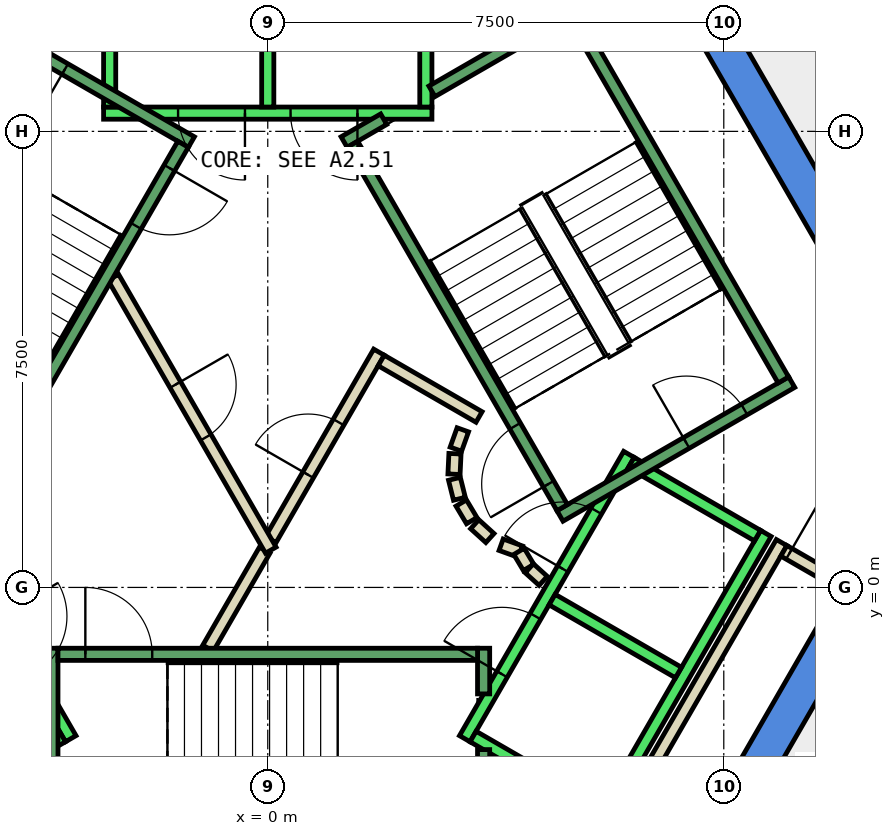
"""IFC4 building model, lengths in metres.
Left out: names, types, materials, properties, quantities, classifications, styles, units other than length and angle.
Written with IfcOpenShell. Run it as: python <this file> out.ifc"""

import sys

from ifc_helpers import new_model, si_unit, direction, frame, frame_2d, origin, place, context, subcontext, project, spatial, polyline, rectangle, outline, extrude, element, fill, save


model = new_model("IFC4")
c1 = context("Model", 3, precision=1e-05, world=origin(), true_north=direction((0.0, 1.0)))
c2 = subcontext(c1, "Body", "Model", "MODEL_VIEW")
j1 = project(units=[si_unit("LENGTHUNIT", "METRE"), si_unit("PLANEANGLEUNIT", "RADIAN")], contexts=[c1])
p1 = place(None, origin())
s1 = spatial("IfcSite", under=j1, at=p1, CompositionType="ELEMENT")
p2 = place(p1, origin())
s2 = spatial("IfcBuilding", under=s1, at=p2, CompositionType="ELEMENT")
p3 = place(p2, frame((0.0, 0.0, 245.0)))
s3 = spatial("IfcBuildingStorey", under=s2, at=p3, CompositionType="ELEMENT", Elevation=245.0)
p4 = place(p3, frame((0.0, 0.0, -0.34)))
e1 = element("IfcWall", 1, at=p4, inside=s3, PredefinedType="SHEAR", context=c2, shape_type="SweptSolid", body=[
    extrude(outline(polyline([(6.786, 10.747), (6.266, 10.447), (10.854, 2.5), (11.547, 2.5), (6.786, 10.747)])), origin(), (0.0, 0.0, 1.0), 3.6),
])
p5 = place(p3, frame((0.0, 0.0, -0.34)))
e2 = element("IfcWall", 2, at=p5, inside=s3, PredefinedType="SHEAR", context=c2, shape_type="SweptSolid", body=[
    extrude(outline(polyline([(5.774, -7.5), (11.547, 2.5), (10.854, 2.5), (5.427, -6.9), (5.774, -7.5)])), origin(), (0.0, 0.0, 1.0), 3.6),
])
p6 = place(p3, frame((5.751, -3.938, 0.0), z_axis=(0.0, 0.0, 1.0), x_axis=(0.500034260056, 0.866005622828, 0.0)))
e3 = element("IfcWall", 3, at=p6, inside=s3, PredefinedType="PARTITIONING", context=c2, shape_type="SweptSolid", body=[
    extrude(rectangle(XDim=5.399, YDim=0.2, at=frame_2d((2.7, 0.0))), origin(), (0.0, 0.0, 1.0), 3.26),
])
p7 = place(p3, frame((8.488, 0.602, 0.0), z_axis=(0.0, 0.0, 1.0), x_axis=(0.866063652425, -0.499933745558, 0.0)))
e4 = element("IfcWall", 4, at=p7, inside=s3, PredefinedType="PARTITIONING", context=c2, shape_type="SweptSolid", body=[
    extrude(rectangle(XDim=1.1, YDim=0.2, at=frame_2d((0.55, 0.0))), origin(), (0.0, 0.0, 1.0), 3.26),
])
p8 = place(p7, frame((0.1, 0.0, 0.0)))
e5 = element("IfcOpeningElement", 5, at=p8, cuts=e4, PredefinedType="OPENING", context=c2, shape_type="SweptSolid", body=[
    extrude(rectangle(XDim=0.9, YDim=2.1, at=frame_2d((0.45, 1.05))), frame((0.0, 0.11, 0.0), z_axis=(0.0, -1.0, 0.0), x_axis=(1.0, 0.0, 0.0)), (0.0, 0.0, 1.0), 0.22),
])
p9 = place(p3, frame((-0.982, -1.0, 0.0), z_axis=(0.0, 0.0, 1.0), x_axis=(0.50024047865, 0.865886518847, 0.0)))
e6 = element("IfcWall", 6, at=p9, inside=s3, PredefinedType="PARTITIONING", context=c2, shape_type="SweptSolid", body=[
    extrude(rectangle(XDim=1.863, YDim=0.2, at=frame_2d((0.931, 0.0))), origin(), (0.0, 0.0, 1.0), 3.26),
])
p10 = place(p3, frame((0.05, 0.787, 0.0), z_axis=(0.0, 0.0, 1.0), x_axis=(0.499954076797, 0.866051915934, 0.0)))
e7 = element("IfcWall", 7, at=p10, inside=s3, PredefinedType="PARTITIONING", context=c2, shape_type="SweptSolid", body=[
    extrude(rectangle(XDim=3.558, YDim=0.2, at=frame_2d((1.779, 0.0))), origin(), (0.0, 0.0, 1.0), 3.26),
])
p11 = place(p10, frame((1.229, 0.0, 0.0)))
e8 = element("IfcOpeningElement", 8, at=p11, cuts=e7, PredefinedType="OPENING", context=c2, shape_type="SweptSolid", body=[
    extrude(rectangle(XDim=1.0, YDim=2.1, at=frame_2d((0.5, 1.05))), frame((0.0, 0.11, 0.0), z_axis=(0.0, -1.0, 0.0), x_axis=(1.0, 0.0, 0.0)), (0.0, 0.0, 1.0), 0.22),
])
p12 = place(p3, frame((1.866, 3.732, 0.0), z_axis=(0.0, 0.0, 1.0), x_axis=(0.866043361281, -0.499968895414, 0.0)))
e9 = element("IfcWall", 9, at=p12, inside=s3, PredefinedType="PARTITIONING", context=c2, shape_type="SweptSolid", body=[
    extrude(rectangle(XDim=1.858, YDim=0.2, at=frame_2d((0.929, 0.0))), origin(), (0.0, 0.0, 1.0), 3.26),
])
p13 = place(p3, frame((3.208, 2.592, 0.0), z_axis=(0.0, 0.0, 1.0), x_axis=(-0.337388820924, -0.941365382578, 0.0)))
e10 = element("IfcWall", 10, at=p13, inside=s3, PredefinedType="PARTITIONING", context=c2, shape_type="SweptSolid", body=[
    extrude(rectangle(XDim=0.338, YDim=0.2, at=frame_2d((0.169, 0.0))), origin(), (0.0, 0.0, 1.0), 3.26),
])
p14 = place(p3, frame((3.079, 2.199, 0.0), z_axis=(0.0, 0.0, 1.0), x_axis=(-0.047771483479, -0.998858290933, 0.0)))
e11 = element("IfcWall", 11, at=p14, inside=s3, PredefinedType="PARTITIONING", context=c2, shape_type="SweptSolid", body=[
    extrude(rectangle(XDim=0.337, YDim=0.2, at=frame_2d((0.169, 0.0))), origin(), (0.0, 0.0, 1.0), 3.26),
])
p15 = place(p3, frame((3.07, 1.786, 0.0), z_axis=(0.0, 0.0, 1.0), x_axis=(0.242705583207, -0.970099994784, 0.0)))
e12 = element("IfcWall", 12, at=p15, inside=s3, PredefinedType="PARTITIONING", context=c2, shape_type="SweptSolid", body=[
    extrude(rectangle(XDim=0.338, YDim=0.2, at=frame_2d((0.169, 0.0))), origin(), (0.0, 0.0, 1.0), 3.26),
])
for number, where, z_axis, x_axis in (
    (13, (3.182, 1.388, 0.0), (0.0, 0.0, 1.0), (0.512, -0.859, 0.0)),
    (14, (3.404, 1.039, 0.0), (0.0, 0.0, 1.0), (0.74, -0.672, 0.0)),
):
    element("IfcWall", number, at=place(p3, frame(where, z_axis=z_axis, x_axis=x_axis)), inside=s3, PredefinedType="PARTITIONING", context=c2, shape_type="SweptSolid", body=[
        extrude(rectangle(XDim=0.338, YDim=0.2, at=frame_2d((0.169, 0.0))), origin(), (0.0, 0.0, 1.0), 3.26),
    ])
p16 = place(p3, frame((3.838, 0.702, 0.0), z_axis=(0.0, 0.0, 1.0), x_axis=(0.941035081519, -0.338308993895, 0.0)))
e15 = element("IfcWall", 15, at=p16, inside=s3, PredefinedType="PARTITIONING", context=c2, shape_type="SweptSolid", body=[
    extrude(rectangle(XDim=0.337, YDim=0.2, at=frame_2d((0.168, 0.0))), origin(), (0.0, 0.0, 1.0), 3.26),
])
p17 = place(p3, frame((4.132, 0.593, 0.0), z_axis=(0.0, 0.0, 1.0), x_axis=(0.513561617048, -0.858052717201, 0.0)))
e16 = element("IfcWall", 16, at=p17, inside=s3, PredefinedType="PARTITIONING", context=c2, shape_type="SweptSolid", body=[
    extrude(rectangle(XDim=0.308, YDim=0.2, at=frame_2d((0.154, 0.0))), origin(), (0.0, 0.0, 1.0), 3.26),
])
p18 = place(p3, frame((4.301, 0.315, 0.0), z_axis=(0.0, 0.0, 1.0), x_axis=(0.741798017506, -0.670623367639, 0.0)))
e17 = element("IfcWall", 17, at=p18, inside=s3, PredefinedType="PARTITIONING", context=c2, shape_type="SweptSolid", body=[
    extrude(rectangle(XDim=0.309, YDim=0.2, at=frame_2d((0.154, 0.0))), origin(), (0.0, 0.0, 1.0), 3.26),
])
p19 = place(p3, frame((-2.54, 5.1, 0.0), z_axis=(0.0, 0.0, 1.0), x_axis=(0.499925051871, -0.866068670783, 0.0)))
e18 = element("IfcWall", 18, at=p19, inside=s3, PredefinedType="PARTITIONING", context=c2, shape_type="SweptSolid", body=[
    extrude(rectangle(XDim=5.181, YDim=0.2, at=frame_2d((2.59, 0.0))), origin(), (0.0, 0.0, 1.0), 3.26),
])
p20 = place(p19, frame((2.04, 0.0, 0.0)))
e19 = element("IfcOpeningElement", 19, at=p20, cuts=e18, PredefinedType="OPENING", context=c2, shape_type="SweptSolid", body=[
    extrude(rectangle(XDim=1.0, YDim=2.1, at=frame_2d((0.5, 1.05))), frame((0.0, 0.11, 0.0), z_axis=(0.0, -1.0, 0.0), x_axis=(1.0, 0.0, 0.0)), (0.0, 0.0, 1.0), 0.22),
])
p21 = place(p3, frame((2.7, 7.8, 0.0), z_axis=(0.0, 0.0, 1.0), x_axis=(-1.0, 0.0, 0.0)))
e20 = element("IfcWall", 20, at=p21, inside=s3, PredefinedType="STANDARD", context=c2, shape_type="SweptSolid", body=[
    extrude(rectangle(XDim=5.4, YDim=0.2, at=frame_2d((2.7, 0.0))), origin(), (0.0, 0.0, 1.0), 3.26),
])
p22 = place(p21, frame((1.225, 0.0, 0.0)))
e21 = element("IfcOpeningElement", 21, at=p22, cuts=e20, PredefinedType="OPENING", context=c2, shape_type="SweptSolid", body=[
    extrude(rectangle(XDim=1.1, YDim=2.1, at=frame_2d((0.55, 1.05))), frame((0.0, 0.11, 0.0), z_axis=(0.0, -1.0, 0.0), x_axis=(1.0, 0.0, 0.0)), (0.0, 0.0, 1.0), 0.22),
])
p23 = place(p21, frame((3.075, 0.0, 0.0)))
e22 = element("IfcOpeningElement", 22, at=p23, cuts=e20, PredefinedType="OPENING", context=c2, shape_type="SweptSolid", body=[
    extrude(rectangle(XDim=1.1, YDim=2.1, at=frame_2d((0.55, 1.05))), frame((0.0, 0.11, 0.0), z_axis=(0.0, -1.0, 0.0), x_axis=(1.0, 0.0, 0.0)), (0.0, 0.0, 1.0), 0.22),
])
for number, where, z_axis, x_axis in (
    (23, (2.6, 7.9, 0.0), (0.0, 0.0, 1.0), (0.0, 1.0, 0.0)),
    (24, (0.0, 7.9, 0.0), (0.0, 0.0, 1.0), (0.0, 1.0, 0.0)),
    (25, (-2.6, 7.9, 0.0), (0.0, 0.0, 1.0), (0.0, 1.0, 0.0)),
):
    element("IfcWall", number, at=place(p3, frame(where, z_axis=z_axis, x_axis=x_axis)), inside=s3, PredefinedType="STANDARD", context=c2, shape_type="SweptSolid", body=[
        extrude(rectangle(XDim=2.4, YDim=0.2, at=frame_2d((1.2, 0.0))), origin(), (0.0, 0.0, 1.0), 3.26),
    ])
p24 = place(p3, frame((-5.94, 2.188, 0.0), z_axis=(0.0, 0.0, 1.0), x_axis=(0.500034260056, -0.866005622828, 0.0)))
e26 = element("IfcWall", 26, at=p24, inside=s3, PredefinedType="STANDARD", context=c2, shape_type="SweptSolid", body=[
    extrude(rectangle(XDim=5.399, YDim=0.2, at=frame_2d((2.7, 0.0))), origin(), (0.0, 0.0, 1.0), 3.26),
])
p25 = place(p24, frame((3.075, 0.0, 0.0)))
e27 = element("IfcOpeningElement", 27, at=p25, cuts=e26, PredefinedType="OPENING", context=c2, shape_type="SweptSolid", body=[
    extrude(rectangle(XDim=1.1, YDim=2.1, at=frame_2d((0.55, 1.05))), frame((0.0, 0.11, 0.0), z_axis=(0.0, -1.0, 0.0), x_axis=(1.0, 0.0, 0.0)), (0.0, 0.0, 1.0), 0.22),
])
p26 = place(p24, frame((1.225, 0.0, 0.0)))
e28 = element("IfcOpeningElement", 28, at=p26, cuts=e26, PredefinedType="OPENING", context=c2, shape_type="SweptSolid", body=[
    extrude(rectangle(XDim=1.1, YDim=2.1, at=frame_2d((0.55, 1.05))), frame((0.0, 0.11, 0.0), z_axis=(0.0, -1.0, 0.0), x_axis=(1.0, 0.0, 0.0)), (0.0, 0.0, 1.0), 0.22),
])
p27 = place(p3, frame((-3.377, -2.452, 0.0), z_axis=(0.0, 0.0, 1.0), x_axis=(-0.865955154139, -0.50012165622, 0.0)))
e29 = element("IfcWall", 29, at=p27, inside=s3, PredefinedType="STANDARD", context=c2, shape_type="SweptSolid", body=[
    extrude(rectangle(XDim=2.4, YDim=0.2, at=frame_2d((1.2, 0.0))), origin(), (0.0, 0.0, 1.0), 3.26),
])
p28 = place(p3, frame((3.24, -2.488, 0.0), z_axis=(0.0, 0.0, 1.0), x_axis=(0.500034260056, 0.866005622828, 0.0)))
e30 = element("IfcWall", 30, at=p28, inside=s3, PredefinedType="STANDARD", context=c2, shape_type="SweptSolid", body=[
    extrude(rectangle(XDim=5.399, YDim=0.2, at=frame_2d((2.7, 0.0))), origin(), (0.0, 0.0, 1.0), 3.26),
])
p29 = place(p28, frame((3.225, 0.0, 0.0)))
e31 = element("IfcOpeningElement", 31, at=p29, cuts=e30, PredefinedType="OPENING", context=c2, shape_type="SweptSolid", body=[
    extrude(rectangle(XDim=1.1, YDim=2.1, at=frame_2d((0.55, 1.05))), frame((0.0, 0.11, 0.0), z_axis=(0.0, -1.0, 0.0), x_axis=(1.0, 0.0, 0.0)), (0.0, 0.0, 1.0), 0.22),
])
p30 = place(p28, frame((1.225, 0.0, 0.0)))
e32 = element("IfcOpeningElement", 32, at=p30, cuts=e30, PredefinedType="OPENING", context=c2, shape_type="SweptSolid", body=[
    extrude(rectangle(XDim=1.1, YDim=2.1, at=frame_2d((0.55, 1.05))), frame((0.0, 0.11, 0.0), z_axis=(0.0, -1.0, 0.0), x_axis=(1.0, 0.0, 0.0)), (0.0, 0.0, 1.0), 0.22),
])
p31 = place(p3, frame((5.492, -3.788, 0.0), z_axis=(0.0, 0.0, 1.0), x_axis=(0.500034260056, 0.866005622828, 0.0)))
e33 = element("IfcWall", 33, at=p31, inside=s3, PredefinedType="STANDARD", context=c2, shape_type="SweptSolid", body=[
    extrude(rectangle(XDim=5.399, YDim=0.2, at=frame_2d((2.7, 0.0))), origin(), (0.0, 0.0, 1.0), 3.26),
])
p32 = place(p3, frame((3.377, -2.452, 0.0), z_axis=(0.0, 0.0, 1.0), x_axis=(0.865955154139, -0.50012165622, 0.0)))
e34 = element("IfcWall", 34, at=p32, inside=s3, PredefinedType="STANDARD", context=c2, shape_type="SweptSolid", body=[
    extrude(rectangle(XDim=2.4, YDim=0.2, at=frame_2d((1.2, 0.0))), origin(), (0.0, 0.0, 1.0), 3.26),
])
for number, where, z_axis, x_axis in (
    (35, (4.677, -0.2, 0.0), (0.0, 0.0, 1.0), (0.866, -0.5, 0.0)),
    (36, (5.977, 2.052, 0.0), (0.0, 0.0, 1.0), (0.866, -0.5, 0.0)),
):
    element("IfcWall", number, at=place(p3, frame(where, z_axis=z_axis, x_axis=x_axis)), inside=s3, PredefinedType="STANDARD", context=c2, shape_type="SweptSolid", body=[
        extrude(rectangle(XDim=2.399, YDim=0.2, at=frame_2d((1.2, 0.0))), origin(), (0.0, 0.0, 1.0), 3.26),
    ])
p33 = place(p3, frame((-3.55, -1.0, 0.0), z_axis=(0.0, 0.0, 1.0), x_axis=(0.0, -1.0, 0.0)))
e37 = element("IfcWall", 37, at=p33, inside=s3, PredefinedType="STANDARD", context=c2, shape_type="SweptSolid", body=[
    extrude(rectangle(XDim=4.4, YDim=0.2, at=frame_2d((2.2, 0.0))), origin(), (0.0, 0.0, 1.0), 3.26),
])
p34 = place(p33, frame((2.4, 0.0, 0.0)))
e38 = element("IfcOpeningElement", 38, at=p34, cuts=e37, PredefinedType="OPENING", context=c2, shape_type="SweptSolid", body=[
    extrude(rectangle(XDim=1.1, YDim=2.2, at=frame_2d((0.55, 1.1))), frame((0.0, 0.11, 0.0), z_axis=(0.0, -1.0, 0.0), x_axis=(1.0, 0.0, 0.0)), (0.0, 0.0, 1.0), 0.22),
])
p35 = place(p3, frame((3.55, -2.667, 0.0), z_axis=(0.0, 0.0, 1.0), x_axis=(0.0, -1.0, 0.0)))
e39 = element("IfcWall", 39, at=p35, inside=s3, PredefinedType="STANDARD", context=c2, shape_type="SweptSolid", body=[
    extrude(rectangle(XDim=2.733, YDim=0.2, at=frame_2d((1.366, 0.0))), origin(), (0.0, 0.0, 1.0), 3.26),
])
p36 = place(p3, frame((3.55, -1.0, 0.0), z_axis=(0.0, 0.0, 1.0), x_axis=(0.0, -1.0, 0.0)))
e40 = element("IfcWall", 40, at=p36, inside=s3, PredefinedType="STANDARD", context=c2, shape_type="SweptSolid", body=[
    extrude(rectangle(XDim=0.751, YDim=0.2, at=frame_2d((0.375, 0.0))), origin(), (0.0, 0.0, 1.0), 3.26),
])
p37 = place(p3, frame((-3.45, -1.1, 0.0), z_axis=(0.0, 0.0, 1.0), x_axis=(1.0, 0.0, 0.0)))
e41 = element("IfcWall", 41, at=p37, inside=s3, PredefinedType="STANDARD", context=c2, shape_type="SweptSolid", body=[
    extrude(rectangle(XDim=6.9, YDim=0.2, at=frame_2d((3.45, 0.0))), origin(), (0.0, 0.0, 1.0), 3.26),
])
p38 = place(p37, frame((0.45, 0.0, 0.0)))
e42 = element("IfcOpeningElement", 42, at=p38, cuts=e41, PredefinedType="OPENING", context=c2, shape_type="SweptSolid", body=[
    extrude(rectangle(XDim=1.1, YDim=2.2, at=frame_2d((0.55, 1.1))), frame((0.0, 0.11, 0.0), z_axis=(0.0, -1.0, 0.0), x_axis=(1.0, 0.0, 0.0)), (0.0, 0.0, 1.0), 0.22),
])
p39 = place(p3, frame((4.806, 1.176, 0.0), z_axis=(0.0, 0.0, 1.0), x_axis=(0.866059941101, 0.499940174841, 0.0)))
e43 = element("IfcWall", 43, at=p39, inside=s3, PredefinedType="STANDARD", context=c2, shape_type="SweptSolid", body=[
    extrude(rectangle(XDim=4.4, YDim=0.2, at=frame_2d((2.2, 0.0))), origin(), (0.0, 0.0, 1.0), 3.26),
])
p40 = place(p39, frame((2.4, 0.0, 0.0)))
e44 = element("IfcOpeningElement", 44, at=p40, cuts=e43, PredefinedType="OPENING", context=c2, shape_type="SweptSolid", body=[
    extrude(rectangle(XDim=1.1, YDim=2.2, at=frame_2d((0.55, 1.1))), frame((0.0, 0.11, 0.0), z_axis=(0.0, -1.0, 0.0), x_axis=(1.0, 0.0, 0.0)), (0.0, 0.0, 1.0), 0.22),
])
p41 = place(p3, frame((2.7, 8.158, 0.0), z_axis=(0.0, 0.0, 1.0), x_axis=(0.86611865017, 0.499838457731, 0.0)))
e45 = element("IfcWall", 45, at=p41, inside=s3, PredefinedType="STANDARD", context=c2, shape_type="SweptSolid", body=[
    extrude(rectangle(XDim=2.733, YDim=0.2, at=frame_2d((1.366, 0.0))), origin(), (0.0, 0.0, 1.0), 3.26),
])
p42 = place(p3, frame((1.256, 7.324, 0.0), z_axis=(0.0, 0.0, 1.0), x_axis=(0.865915093549, 0.500191014278, 0.0)))
e46 = element("IfcWall", 46, at=p42, inside=s3, PredefinedType="STANDARD", context=c2, shape_type="SweptSolid", body=[
    extrude(rectangle(XDim=0.752, YDim=0.2, at=frame_2d((0.376, 0.0))), origin(), (0.0, 0.0, 1.0), 3.26),
])
p43 = place(p3, frame((4.843, 1.312, 0.0), z_axis=(0.0, 0.0, 1.0), x_axis=(-0.499963383562, 0.866046543262, 0.0)))
e47 = element("IfcWall", 47, at=p43, inside=s3, PredefinedType="STANDARD", context=c2, shape_type="SweptSolid", body=[
    extrude(rectangle(XDim=6.9, YDim=0.2, at=frame_2d((3.45, 0.0))), origin(), (0.0, 0.0, 1.0), 3.26),
])
p44 = place(p43, frame((0.45, 0.0, 0.0)))
e48 = element("IfcOpeningElement", 48, at=p44, cuts=e47, PredefinedType="OPENING", context=c2, shape_type="SweptSolid", body=[
    extrude(rectangle(XDim=1.1, YDim=2.2, at=frame_2d((0.55, 1.1))), frame((0.0, 0.11, 0.0), z_axis=(0.0, -1.0, 0.0), x_axis=(1.0, 0.0, 0.0)), (0.0, 0.0, 1.0), 0.22),
])
p45 = place(p3, frame((8.48, 3.412, 0.0), z_axis=(0.0, 0.0, 1.0), x_axis=(-0.499978703459, 0.866037698999, 0.0)))
e49 = element("IfcWall", 49, at=p45, inside=s3, PredefinedType="STANDARD", context=c2, shape_type="SweptSolid", body=[
    extrude(rectangle(XDim=6.9, YDim=0.2, at=frame_2d((3.45, 0.0))), origin(), (0.0, 0.0, 1.0), 3.26),
])
p46 = place(p3, frame((-1.256, 7.324, 0.0), z_axis=(0.0, 0.0, 1.0), x_axis=(-0.866046073146, 0.499964197906, 0.0)))
e50 = element("IfcWall", 50, at=p46, inside=s3, PredefinedType="STANDARD", context=c2, shape_type="SweptSolid", body=[
    extrude(rectangle(XDim=4.4, YDim=0.2, at=frame_2d((2.2, 0.0))), origin(), (0.0, 0.0, 1.0), 3.26),
])
p47 = place(p46, frame((2.4, 0.0, 0.0)))
e51 = element("IfcOpeningElement", 51, at=p47, cuts=e50, PredefinedType="OPENING", context=c2, shape_type="SweptSolid", body=[
    extrude(rectangle(XDim=1.1, YDim=2.2, at=frame_2d((0.55, 1.1))), frame((0.0, 0.11, 0.0), z_axis=(0.0, -1.0, 0.0), x_axis=(1.0, 0.0, 0.0)), (0.0, 0.0, 1.0), 0.22),
])
p48 = place(p3, frame((-1.393, 7.288, 0.0), z_axis=(0.0, 0.0, 1.0), x_axis=(-0.499963383562, -0.866046543262, 0.0)))
e52 = element("IfcWall", 52, at=p48, inside=s3, PredefinedType="STANDARD", context=c2, shape_type="SweptSolid", body=[
    extrude(rectangle(XDim=6.9, YDim=0.2, at=frame_2d((3.45, 0.0))), origin(), (0.0, 0.0, 1.0), 3.26),
])
p49 = place(p48, frame((0.45, 0.0, 0.0)))
e53 = element("IfcOpeningElement", 53, at=p49, cuts=e52, PredefinedType="OPENING", context=c2, shape_type="SweptSolid", body=[
    extrude(rectangle(XDim=1.1, YDim=2.2, at=frame_2d((0.55, 1.1))), frame((0.0, 0.11, 0.0), z_axis=(0.0, -1.0, 0.0), x_axis=(1.0, 0.0, 0.0)), (0.0, 0.0, 1.0), 0.22),
])
p50 = place(p11, origin())
e54 = element("IfcDoor", 54, at=p50, inside=s3, OperationType="SINGLE_SWING_RIGHT", PredefinedType="DOOR", context=c2, shape_type="SweptSolid", body=[
    extrude(rectangle(XDim=1.0, YDim=2.1, at=frame_2d((0.5, 1.05))), frame((0.0, 0.025, 0.0), z_axis=(0.0, -1.0, 0.0), x_axis=(1.0, 0.0, 0.0)), (0.0, 0.0, 1.0), 0.05),
])
fill(e8, e54)
p51 = place(p20, origin())
e55 = element("IfcDoor", 55, at=p51, inside=s3, OperationType="SINGLE_SWING_RIGHT", PredefinedType="DOOR", context=c2, shape_type="SweptSolid", body=[
    extrude(rectangle(XDim=1.0, YDim=2.1, at=frame_2d((0.5, 1.05))), frame((0.0, 0.025, 0.0), z_axis=(0.0, -1.0, 0.0), x_axis=(1.0, 0.0, 0.0)), (0.0, 0.0, 1.0), 0.05),
])
fill(e19, e55)
p52 = place(p8, origin())
e56 = element("IfcDoor", 56, at=p52, inside=s3, OperationType="SINGLE_SWING_RIGHT", PredefinedType="DOOR", context=c2, shape_type="SweptSolid", body=[
    extrude(rectangle(XDim=0.9, YDim=2.1, at=frame_2d((0.45, 1.05))), frame((0.0, 0.025, 0.0), z_axis=(0.0, -1.0, 0.0), x_axis=(1.0, 0.0, 0.0)), (0.0, 0.0, 1.0), 0.05),
])
fill(e5, e56)
p53 = place(p22, origin())
e57 = element("IfcDoor", 57, at=p53, inside=s3, OperationType="SLIDING_TO_LEFT", PredefinedType="DOOR", context=c2, shape_type="SweptSolid", body=[
    extrude(rectangle(XDim=1.1, YDim=2.1, at=frame_2d((0.55, 1.05))), frame((0.0, 0.025, 0.0), z_axis=(0.0, -1.0, 0.0), x_axis=(1.0, 0.0, 0.0)), (0.0, 0.0, 1.0), 0.05),
])
fill(e21, e57)
p54 = place(p23, origin())
e58 = element("IfcDoor", 58, at=p54, inside=s3, OperationType="SLIDING_TO_LEFT", PredefinedType="DOOR", context=c2, shape_type="SweptSolid", body=[
    extrude(rectangle(XDim=1.1, YDim=2.1, at=frame_2d((0.55, 1.05))), frame((0.0, 0.025, 0.0), z_axis=(0.0, -1.0, 0.0), x_axis=(1.0, 0.0, 0.0)), (0.0, 0.0, 1.0), 0.05),
])
fill(e22, e58)
p55 = place(p29, origin())
e59 = element("IfcDoor", 59, at=p55, inside=s3, OperationType="SLIDING_TO_LEFT", PredefinedType="DOOR", context=c2, shape_type="SweptSolid", body=[
    extrude(rectangle(XDim=1.1, YDim=2.1, at=frame_2d((0.55, 1.05))), frame((0.0, 0.025, 0.0), z_axis=(0.0, -1.0, 0.0), x_axis=(1.0, 0.0, 0.0)), (0.0, 0.0, 1.0), 0.05),
])
fill(e31, e59)
p56 = place(p30, origin())
e60 = element("IfcDoor", 60, at=p56, inside=s3, OperationType="SLIDING_TO_LEFT", PredefinedType="DOOR", context=c2, shape_type="SweptSolid", body=[
    extrude(rectangle(XDim=1.1, YDim=2.1, at=frame_2d((0.55, 1.05))), frame((0.0, 0.025, 0.0), z_axis=(0.0, -1.0, 0.0), x_axis=(1.0, 0.0, 0.0)), (0.0, 0.0, 1.0), 0.05),
])
fill(e32, e60)
p57 = place(p38, origin())
e61 = element("IfcDoor", 61, at=p57, inside=s3, OperationType="SINGLE_SWING_LEFT", PredefinedType="DOOR", context=c2, shape_type="SweptSolid", body=[
    extrude(rectangle(XDim=1.1, YDim=2.2, at=frame_2d((0.55, 1.1))), frame((0.0, 0.025, 0.0), z_axis=(0.0, -1.0, 0.0), x_axis=(1.0, 0.0, 0.0)), (0.0, 0.0, 1.0), 0.05),
])
fill(e42, e61)
p58 = place(p44, origin())
e62 = element("IfcDoor", 62, at=p58, inside=s3, OperationType="SINGLE_SWING_LEFT", PredefinedType="DOOR", context=c2, shape_type="SweptSolid", body=[
    extrude(rectangle(XDim=1.1, YDim=2.2, at=frame_2d((0.55, 1.1))), frame((0.0, 0.025, 0.0), z_axis=(0.0, -1.0, 0.0), x_axis=(1.0, 0.0, 0.0)), (0.0, 0.0, 1.0), 0.05),
])
fill(e48, e62)
p59 = place(p40, origin())
e63 = element("IfcDoor", 63, at=p59, inside=s3, OperationType="SINGLE_SWING_LEFT", PredefinedType="DOOR", context=c2, shape_type="SweptSolid", body=[
    extrude(rectangle(XDim=1.1, YDim=2.2, at=frame_2d((0.55, 1.1))), frame((0.0, 0.025, 0.0), z_axis=(0.0, -1.0, 0.0), x_axis=(1.0, 0.0, 0.0)), (0.0, 0.0, 1.0), 0.05),
])
fill(e44, e63)
p60 = place(p49, origin())
e64 = element("IfcDoor", 64, at=p60, inside=s3, OperationType="SINGLE_SWING_LEFT", PredefinedType="DOOR", context=c2, shape_type="SweptSolid", body=[
    extrude(rectangle(XDim=1.1, YDim=2.2, at=frame_2d((0.55, 1.1))), frame((0.0, 0.025, 0.0), z_axis=(0.0, -1.0, 0.0), x_axis=(1.0, 0.0, 0.0)), (0.0, 0.0, 1.0), 0.05),
])
fill(e53, e64)
p61 = place(p47, origin())
e65 = element("IfcDoor", 65, at=p61, inside=s3, OperationType="SINGLE_SWING_LEFT", PredefinedType="DOOR", context=c2, shape_type="SweptSolid", body=[
    extrude(rectangle(XDim=1.1, YDim=2.2, at=frame_2d((0.55, 1.1))), frame((0.0, 0.025, 0.0), z_axis=(0.0, -1.0, 0.0), x_axis=(1.0, 0.0, 0.0)), (0.0, 0.0, 1.0), 0.05),
])
fill(e51, e65)
save(model, sys.argv[1])
